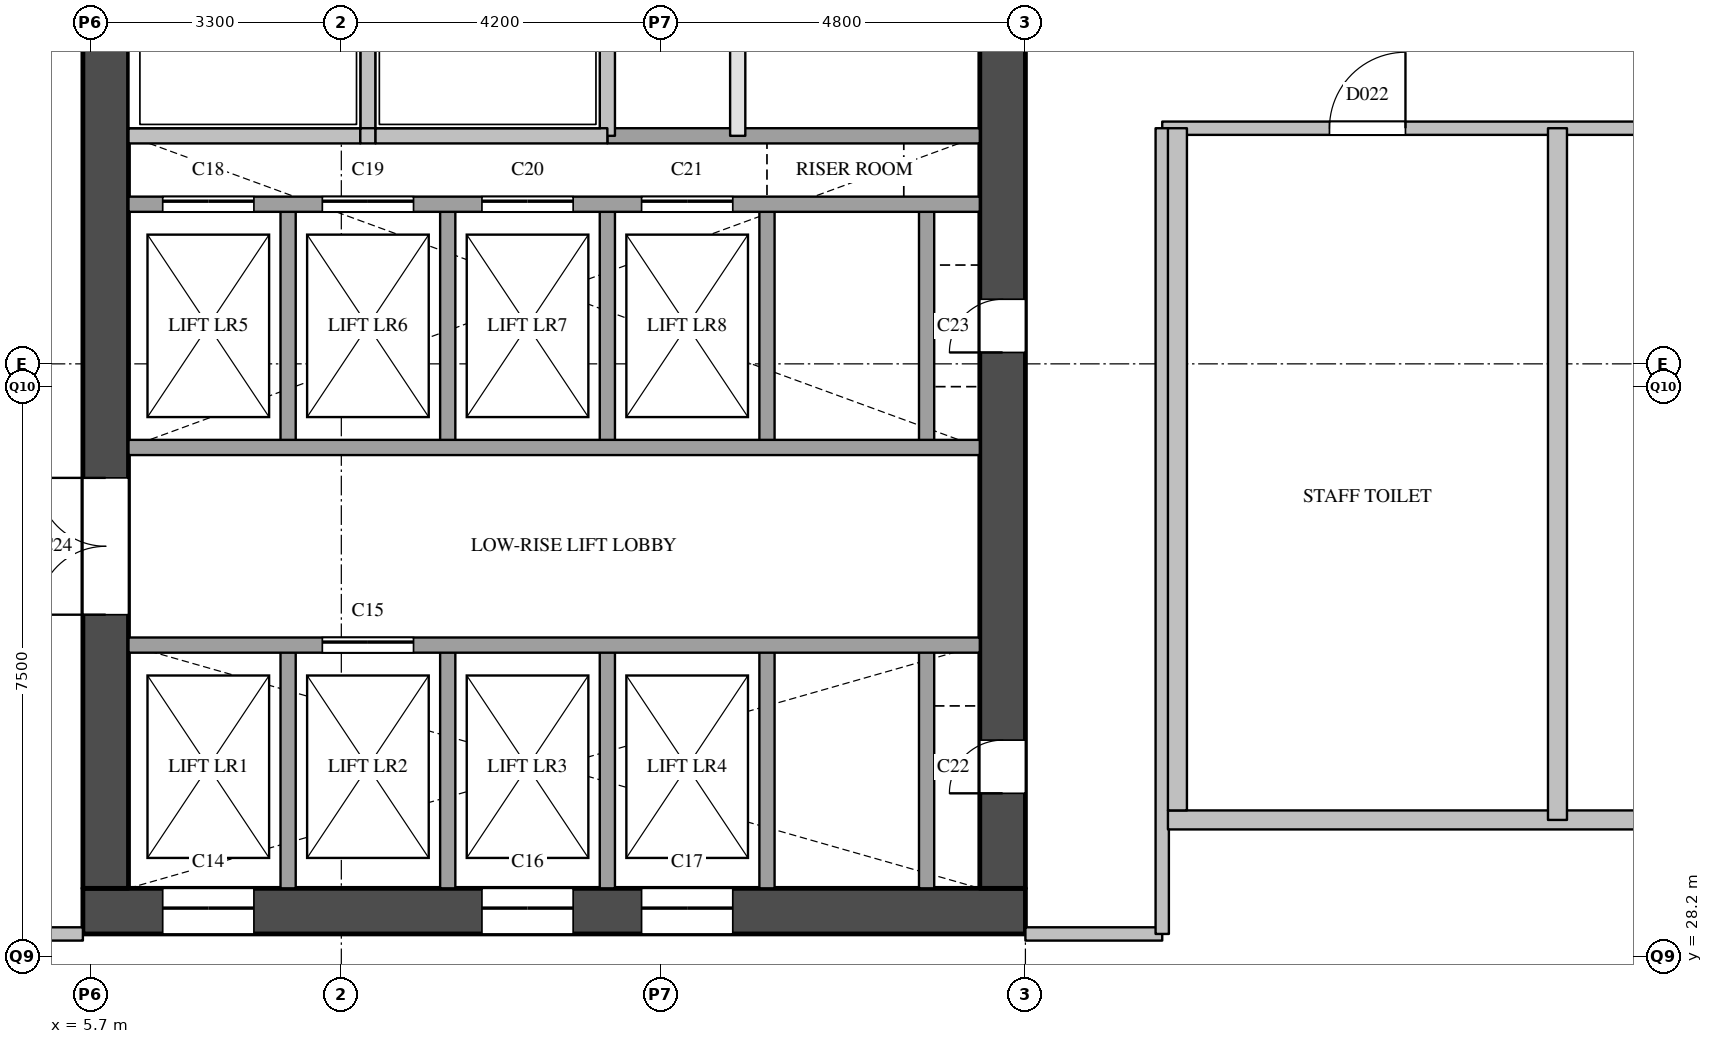
"""IFC4 building model, lengths in metres.
Left out: names, types, materials, properties, quantities, classifications, styles, units other than length and angle.
Written with IfcOpenShell. Run it as: python <this file> out.ifc"""

import sys

from ifc_helpers import new_model, si_unit, direction, frame, frame_2d, origin, place, context, subcontext, project, spatial, rectangle, extrude, element, fill, save


model = new_model("IFC4")
c1 = context("Model", 3, precision=1e-05, world=origin(), true_north=direction((0.0, 1.0)))
c2 = subcontext(c1, "Body", "Model", "MODEL_VIEW")
j1 = project(units=[si_unit("LENGTHUNIT", "METRE"), si_unit("PLANEANGLEUNIT", "RADIAN")], contexts=[c1])
p1 = place(None, origin())
s1 = spatial("IfcSite", under=j1, at=p1, CompositionType="ELEMENT")
p2 = place(p1, origin())
s2 = spatial("IfcBuilding", under=s1, at=p2, CompositionType="ELEMENT")
p3 = place(p2, frame((0.0, 0.0, 119.6)))
s3 = spatial("IfcBuildingStorey", under=s2, at=p3, CompositionType="ELEMENT", Elevation=119.6)
p4 = place(p3, frame((5.6, 28.8, 0.0), z_axis=(0.0, 0.0, 1.0), x_axis=(1.0, 0.0, 0.0)))
e1 = element("IfcWall", 1, at=p4, inside=s3, PredefinedType="SHEAR", context=c2, shape_type="SweptSolid", body=[
    extrude(rectangle(XDim=12.4, YDim=0.6, at=frame_2d((6.2, 0.0))), origin(), (0.0, 0.0, 1.0), 3.3),
])
p5 = place(p4, frame((1.05, 0.0, 0.0)))
e2 = element("IfcOpeningElement", 2, at=p5, cuts=e1, PredefinedType="OPENING", context=c2, shape_type="SweptSolid", body=[
    extrude(rectangle(XDim=1.2, YDim=2.1, at=frame_2d((0.6, 1.05))), frame((0.0, 0.31, 0.0), z_axis=(0.0, -1.0, 0.0), x_axis=(1.0, 0.0, 0.0)), (0.0, 0.0, 1.0), 0.62),
])
p6 = place(p4, frame((5.25, 0.0, 0.0)))
e3 = element("IfcOpeningElement", 3, at=p6, cuts=e1, PredefinedType="OPENING", context=c2, shape_type="SweptSolid", body=[
    extrude(rectangle(XDim=1.2, YDim=2.1, at=frame_2d((0.6, 1.05))), frame((0.0, 0.31, 0.0), z_axis=(0.0, -1.0, 0.0), x_axis=(1.0, 0.0, 0.0)), (0.0, 0.0, 1.0), 0.62),
])
p7 = place(p4, frame((7.35, 0.0, 0.0)))
e4 = element("IfcOpeningElement", 4, at=p7, cuts=e1, PredefinedType="OPENING", context=c2, shape_type="SweptSolid", body=[
    extrude(rectangle(XDim=1.2, YDim=2.1, at=frame_2d((0.6, 1.05))), frame((0.0, 0.31, 0.0), z_axis=(0.0, -1.0, 0.0), x_axis=(1.0, 0.0, 0.0)), (0.0, 0.0, 1.0), 0.62),
])
p8 = place(p3, frame((5.9, 29.1, 0.0), z_axis=(0.0, 0.0, 1.0), x_axis=(0.0, 1.0, 0.0)))
e5 = element("IfcWall", 5, at=p8, inside=s3, PredefinedType="SHEAR", context=c2, shape_type="SweptSolid", body=[
    extrude(rectangle(XDim=20.3, YDim=0.6, at=frame_2d((10.15, 0.0))), origin(), (0.0, 0.0, 1.0), 3.3),
])
p9 = place(p8, frame((3.6, 0.0, 0.0)))
e6 = element("IfcOpeningElement", 6, at=p9, cuts=e5, PredefinedType="OPENING", context=c2, shape_type="SweptSolid", body=[
    extrude(rectangle(XDim=1.8, YDim=2.1, at=frame_2d((0.9, 1.05))), frame((0.0, 0.31, 0.0), z_axis=(0.0, -1.0, 0.0), x_axis=(1.0, 0.0, 0.0)), (0.0, 0.0, 1.0), 0.62),
])
p10 = place(p8, frame((16.4, 0.0, 0.0)))
e7 = element("IfcOpeningElement", 7, at=p10, cuts=e5, PredefinedType="OPENING", context=c2, shape_type="SweptSolid", body=[
    extrude(rectangle(XDim=1.0, YDim=2.1, at=frame_2d((0.5, 1.05))), frame((0.0, 0.31, 0.0), z_axis=(0.0, -1.0, 0.0), x_axis=(1.0, 0.0, 0.0)), (0.0, 0.0, 1.0), 0.62),
])
p11 = place(p3, frame((17.7, 29.1, 0.0), z_axis=(0.0, 0.0, 1.0), x_axis=(0.0, 1.0, 0.0)))
e8 = element("IfcWall", 8, at=p11, inside=s3, PredefinedType="SHEAR", context=c2, shape_type="SweptSolid", body=[
    extrude(rectangle(XDim=20.3, YDim=0.6, at=frame_2d((10.15, 0.0))), origin(), (0.0, 0.0, 1.0), 3.3),
])
p12 = place(p11, frame((1.25, 0.0, 0.0)))
e9 = element("IfcOpeningElement", 9, at=p12, cuts=e8, PredefinedType="OPENING", context=c2, shape_type="SweptSolid", body=[
    extrude(rectangle(XDim=0.7, YDim=2.1, at=frame_2d((0.35, 1.05))), frame((0.0, 0.31, 0.0), z_axis=(0.0, -1.0, 0.0), x_axis=(1.0, 0.0, 0.0)), (0.0, 0.0, 1.0), 0.62),
])
p13 = place(p11, frame((7.05, 0.0, 0.0)))
e10 = element("IfcOpeningElement", 10, at=p13, cuts=e8, PredefinedType="OPENING", context=c2, shape_type="SweptSolid", body=[
    extrude(rectangle(XDim=0.7, YDim=2.1, at=frame_2d((0.35, 1.05))), frame((0.0, 0.31, 0.0), z_axis=(0.0, -1.0, 0.0), x_axis=(1.0, 0.0, 0.0)), (0.0, 0.0, 1.0), 0.62),
])
p14 = place(p3, frame((8.3, 29.1, 0.0), z_axis=(0.0, 0.0, 1.0), x_axis=(0.0, 1.0, 0.0)))
e11 = element("IfcWall", 11, at=p14, inside=s3, PredefinedType="SOLIDWALL", context=c2, shape_type="SweptSolid", body=[
    extrude(rectangle(XDim=3.2, YDim=0.2, at=frame_2d((1.6, 0.0))), origin(), (0.0, 0.0, 1.0), 3.3),
])
p15 = place(p3, frame((8.3, 34.9, 0.0), z_axis=(0.0, 0.0, 1.0), x_axis=(0.0, 1.0, 0.0)))
e12 = element("IfcWall", 12, at=p15, inside=s3, PredefinedType="SOLIDWALL", context=c2, shape_type="SweptSolid", body=[
    extrude(rectangle(XDim=3.2, YDim=0.2, at=frame_2d((1.6, 0.0))), origin(), (0.0, 0.0, 1.0), 3.3),
])
p16 = place(p3, frame((9.35, 39.0, 0.0), z_axis=(0.0, 0.0, 1.0), x_axis=(0.0, 1.0, 0.0)))
e13 = element("IfcWall", 13, at=p16, inside=s3, PredefinedType="SOLIDWALL", context=c2, shape_type="SweptSolid", body=[
    extrude(rectangle(XDim=1.9, YDim=0.2, at=frame_2d((0.95, 0.0))), origin(), (0.0, 0.0, 1.0), 3.3),
])
p17 = place(p3, frame((10.4, 29.1, 0.0), z_axis=(0.0, 0.0, 1.0), x_axis=(0.0, 1.0, 0.0)))
e14 = element("IfcWall", 14, at=p17, inside=s3, PredefinedType="SOLIDWALL", context=c2, shape_type="SweptSolid", body=[
    extrude(rectangle(XDim=3.2, YDim=0.2, at=frame_2d((1.6, 0.0))), origin(), (0.0, 0.0, 1.0), 3.3),
])
p18 = place(p3, frame((10.4, 34.9, 0.0), z_axis=(0.0, 0.0, 1.0), x_axis=(0.0, 1.0, 0.0)))
e15 = element("IfcWall", 15, at=p18, inside=s3, PredefinedType="SOLIDWALL", context=c2, shape_type="SweptSolid", body=[
    extrude(rectangle(XDim=3.2, YDim=0.2, at=frame_2d((1.6, 0.0))), origin(), (0.0, 0.0, 1.0), 3.3),
])
p19 = place(p3, frame((12.5, 29.1, 0.0), z_axis=(0.0, 0.0, 1.0), x_axis=(0.0, 1.0, 0.0)))
e16 = element("IfcWall", 16, at=p19, inside=s3, PredefinedType="SOLIDWALL", context=c2, shape_type="SweptSolid", body=[
    extrude(rectangle(XDim=3.2, YDim=0.2, at=frame_2d((1.6, 0.0))), origin(), (0.0, 0.0, 1.0), 3.3),
])
p20 = place(p3, frame((12.5, 34.9, 0.0), z_axis=(0.0, 0.0, 1.0), x_axis=(0.0, 1.0, 0.0)))
e17 = element("IfcWall", 17, at=p20, inside=s3, PredefinedType="SOLIDWALL", context=c2, shape_type="SweptSolid", body=[
    extrude(rectangle(XDim=3.2, YDim=0.2, at=frame_2d((1.6, 0.0))), origin(), (0.0, 0.0, 1.0), 3.3),
])
p21 = place(p3, frame((12.5, 39.0, 0.0), z_axis=(0.0, 0.0, 1.0), x_axis=(0.0, 1.0, 0.0)))
e18 = element("IfcWall", 18, at=p21, inside=s3, PredefinedType="SOLIDWALL", context=c2, shape_type="SweptSolid", body=[
    extrude(rectangle(XDim=1.9, YDim=0.2, at=frame_2d((0.95, 0.0))), origin(), (0.0, 0.0, 1.0), 3.3),
])
p22 = place(p3, frame((14.215, 39.0, 0.0), z_axis=(0.0, 0.0, 1.0), x_axis=(0.0, 1.0, 0.0)))
e19 = element("IfcWall", 19, at=p22, inside=s3, PredefinedType="PARTITIONING", context=c2, shape_type="SweptSolid", body=[
    extrude(rectangle(XDim=6.2, YDim=0.2, at=frame_2d((3.1, 0.0))), origin(), (0.0, 0.0, 1.0), 3.3),
])
p23 = place(p3, frame((14.6, 29.1, 0.0), z_axis=(0.0, 0.0, 1.0), x_axis=(0.0, 1.0, 0.0)))
e20 = element("IfcWall", 20, at=p23, inside=s3, PredefinedType="SOLIDWALL", context=c2, shape_type="SweptSolid", body=[
    extrude(rectangle(XDim=3.2, YDim=0.2, at=frame_2d((1.6, 0.0))), origin(), (0.0, 0.0, 1.0), 3.3),
])
p24 = place(p3, frame((14.6, 34.9, 0.0), z_axis=(0.0, 0.0, 1.0), x_axis=(0.0, 1.0, 0.0)))
e21 = element("IfcWall", 21, at=p24, inside=s3, PredefinedType="SOLIDWALL", context=c2, shape_type="SweptSolid", body=[
    extrude(rectangle(XDim=3.2, YDim=0.2, at=frame_2d((1.6, 0.0))), origin(), (0.0, 0.0, 1.0), 3.3),
])
p25 = place(p3, frame((16.7, 29.1, 0.0), z_axis=(0.0, 0.0, 1.0), x_axis=(0.0, 1.0, 0.0)))
e22 = element("IfcWall", 22, at=p25, inside=s3, PredefinedType="SOLIDWALL", context=c2, shape_type="SweptSolid", body=[
    extrude(rectangle(XDim=3.2, YDim=0.2, at=frame_2d((1.6, 0.0))), origin(), (0.0, 0.0, 1.0), 3.3),
])
p26 = place(p3, frame((16.7, 34.9, 0.0), z_axis=(0.0, 0.0, 1.0), x_axis=(0.0, 1.0, 0.0)))
e23 = element("IfcWall", 23, at=p26, inside=s3, PredefinedType="SOLIDWALL", context=c2, shape_type="SweptSolid", body=[
    extrude(rectangle(XDim=3.2, YDim=0.2, at=frame_2d((1.6, 0.0))), origin(), (0.0, 0.0, 1.0), 3.3),
])
p27 = place(p3, frame((6.2, 32.3, 0.0), z_axis=(0.0, 0.0, 1.0), x_axis=(1.0, 0.0, 0.0)))
e24 = element("IfcWall", 24, at=p27, inside=s3, PredefinedType="SOLIDWALL", context=c2, shape_type="SweptSolid", body=[
    extrude(rectangle(XDim=11.2, YDim=0.2, at=frame_2d((5.6, 0.0))), origin(), (0.0, 0.0, 1.0), 3.3),
])
p28 = place(p27, frame((2.55, 0.0, 0.0)))
e25 = element("IfcOpeningElement", 25, at=p28, cuts=e24, PredefinedType="OPENING", context=c2, shape_type="SweptSolid", body=[
    extrude(rectangle(XDim=1.2, YDim=2.1, at=frame_2d((0.6, 1.05))), frame((0.0, 0.11, 0.0), z_axis=(0.0, -1.0, 0.0), x_axis=(1.0, 0.0, 0.0)), (0.0, 0.0, 1.0), 0.22),
])
p29 = place(p3, frame((6.2, 34.9, 0.0), z_axis=(0.0, 0.0, 1.0), x_axis=(1.0, 0.0, 0.0)))
e26 = element("IfcWall", 26, at=p29, inside=s3, PredefinedType="SOLIDWALL", context=c2, shape_type="SweptSolid", body=[
    extrude(rectangle(XDim=11.2, YDim=0.2, at=frame_2d((5.6, 0.0))), origin(), (0.0, 0.0, 1.0), 3.3),
])
p30 = place(p3, frame((6.2, 38.1, 0.0), z_axis=(0.0, 0.0, 1.0), x_axis=(1.0, 0.0, 0.0)))
e27 = element("IfcWall", 27, at=p30, inside=s3, PredefinedType="SOLIDWALL", context=c2, shape_type="SweptSolid", body=[
    extrude(rectangle(XDim=11.2, YDim=0.2, at=frame_2d((5.6, 0.0))), origin(), (0.0, 0.0, 1.0), 3.3),
])
p31 = place(p30, frame((0.45, 0.0, 0.0)))
e28 = element("IfcOpeningElement", 28, at=p31, cuts=e27, PredefinedType="OPENING", context=c2, shape_type="SweptSolid", body=[
    extrude(rectangle(XDim=1.2, YDim=2.1, at=frame_2d((0.6, 1.05))), frame((0.0, 0.11, 0.0), z_axis=(0.0, -1.0, 0.0), x_axis=(1.0, 0.0, 0.0)), (0.0, 0.0, 1.0), 0.22),
])
p32 = place(p30, frame((2.55, 0.0, 0.0)))
e29 = element("IfcOpeningElement", 29, at=p32, cuts=e27, PredefinedType="OPENING", context=c2, shape_type="SweptSolid", body=[
    extrude(rectangle(XDim=1.2, YDim=2.1, at=frame_2d((0.6, 1.05))), frame((0.0, 0.11, 0.0), z_axis=(0.0, -1.0, 0.0), x_axis=(1.0, 0.0, 0.0)), (0.0, 0.0, 1.0), 0.22),
])
p33 = place(p30, frame((4.65, 0.0, 0.0)))
e30 = element("IfcOpeningElement", 30, at=p33, cuts=e27, PredefinedType="OPENING", context=c2, shape_type="SweptSolid", body=[
    extrude(rectangle(XDim=1.2, YDim=2.1, at=frame_2d((0.6, 1.05))), frame((0.0, 0.11, 0.0), z_axis=(0.0, -1.0, 0.0), x_axis=(1.0, 0.0, 0.0)), (0.0, 0.0, 1.0), 0.22),
])
p34 = place(p30, frame((6.75, 0.0, 0.0)))
e31 = element("IfcOpeningElement", 31, at=p34, cuts=e27, PredefinedType="OPENING", context=c2, shape_type="SweptSolid", body=[
    extrude(rectangle(XDim=1.2, YDim=2.1, at=frame_2d((0.6, 1.05))), frame((0.0, 0.11, 0.0), z_axis=(0.0, -1.0, 0.0), x_axis=(1.0, 0.0, 0.0)), (0.0, 0.0, 1.0), 0.22),
])
p35 = place(p3, frame((12.5, 39.0, 0.0), z_axis=(0.0, 0.0, 1.0), x_axis=(1.0, 0.0, 0.0)))
e32 = element("IfcWall", 32, at=p35, inside=s3, PredefinedType="SOLIDWALL", context=c2, shape_type="SweptSolid", body=[
    extrude(rectangle(XDim=4.9, YDim=0.2, at=frame_2d((2.45, 0.0))), origin(), (0.0, 0.0, 1.0), 3.3),
])
p36 = place(p3, frame((6.2, 39.0, 0.0), z_axis=(0.0, 0.0, 1.0), x_axis=(1.0, 0.0, 0.0)))
e33 = element("IfcWall", 33, at=p36, inside=s3, PredefinedType="SOLIDWALL", context=c2, shape_type="SweptSolid", body=[
    extrude(rectangle(XDim=3.05, YDim=0.2, at=frame_2d((1.525, 0.0))), origin(), (0.0, 0.0, 1.0), 3.3),
])
p37 = place(p3, frame((9.25, 39.0, 0.0), z_axis=(0.0, 0.0, 1.0), x_axis=(1.0, 0.0, 0.0)))
e34 = element("IfcWall", 34, at=p37, inside=s3, PredefinedType="SOLIDWALL", context=c2, shape_type="SweptSolid", body=[
    extrude(rectangle(XDim=0.2, YDim=0.2, at=frame_2d((0.1, 0.0))), origin(), (0.0, 0.0, 1.0), 3.3),
])
p38 = place(p3, frame((9.45, 39.0, 0.0), z_axis=(0.0, 0.0, 1.0), x_axis=(1.0, 0.0, 0.0)))
e35 = element("IfcWall", 35, at=p38, inside=s3, PredefinedType="SOLIDWALL", context=c2, shape_type="SweptSolid", body=[
    extrude(rectangle(XDim=3.05, YDim=0.2, at=frame_2d((1.525, 0.0))), origin(), (0.0, 0.0, 1.0), 3.3),
])
for number, where, z_axis, x_axis in (
    (36, (3.8, 28.5, 0.0), (0.0, 0.0, 1.0), (1.0, 0.0, 0.0)),
    (37, (18.0, 28.5, 0.0), (0.0, 0.0, 1.0), (1.0, 0.0, 0.0)),
):
    element("IfcWall", number, at=place(p3, frame(where, z_axis=z_axis, x_axis=x_axis)), inside=s3, PredefinedType="PARTITIONING", context=c2, shape_type="SweptSolid", body=[
        extrude(rectangle(XDim=1.8, YDim=0.175, at=frame_2d((0.9, 0.0))), origin(), (0.0, 0.0, 1.0), 3.3),
    ])
p39 = place(p3, frame((19.8, 39.1, 0.0), z_axis=(0.0, 0.0, 1.0), x_axis=(1.0, 0.0, 0.0)))
e38 = element("IfcWall", 38, at=p39, inside=s3, PredefinedType="PARTITIONING", context=c2, shape_type="SweptSolid", body=[
    extrude(rectangle(XDim=14.4, YDim=0.175, at=frame_2d((7.2, 0.0))), origin(), (0.0, 0.0, 1.0), 2.3),
])
p40 = place(p39, frame((2.2, 0.0, 0.0)))
e39 = element("IfcOpeningElement", 39, at=p40, cuts=e38, PredefinedType="OPENING", context=c2, shape_type="SweptSolid", body=[
    extrude(rectangle(XDim=1.0, YDim=2.1, at=frame_2d((0.5, 1.05))), frame((0.0, 0.097, 0.0), z_axis=(0.0, -1.0, 0.0), x_axis=(1.0, 0.0, 0.0)), (0.0, 0.0, 1.0), 0.195),
])
p41 = place(p39, frame((9.35, 0.0, 0.0)))
e40 = element("IfcOpeningElement", 40, at=p41, cuts=e38, PredefinedType="OPENING", context=c2, shape_type="SweptSolid", body=[
    extrude(rectangle(XDim=0.9, YDim=2.1, at=frame_2d((0.45, 1.05))), frame((0.0, 0.097, 0.0), z_axis=(0.0, -1.0, 0.0), x_axis=(1.0, 0.0, 0.0)), (0.0, 0.0, 1.0), 0.195),
])
p42 = place(p3, frame((19.8, 28.5, 0.0), z_axis=(0.0, 0.0, 1.0), x_axis=(0.0, 1.0, 0.0)))
e41 = element("IfcWall", 41, at=p42, inside=s3, PredefinedType="PARTITIONING", context=c2, shape_type="SweptSolid", body=[
    extrude(rectangle(XDim=10.6, YDim=0.175, at=frame_2d((5.3, 0.0))), origin(), (0.0, 0.0, 1.0), 3.3),
])
p43 = place(p3, frame((19.875, 30.0, 0.0), z_axis=(0.0, 0.0, 1.0), x_axis=(1.0, 0.0, 0.0)))
e42 = element("IfcWall", 42, at=p43, inside=s3, PredefinedType="PARTITIONING", context=c2, shape_type="SweptSolid", body=[
    extrude(rectangle(XDim=14.325, YDim=0.25, at=frame_2d((7.163, 0.0))), origin(), (0.0, 0.0, 1.0), 2.3),
])
p44 = place(p3, frame((20.0, 30.125, 0.0), z_axis=(0.0, 0.0, 1.0), x_axis=(0.0, 1.0, 0.0)))
e43 = element("IfcWall", 43, at=p44, inside=s3, PredefinedType="PARTITIONING", context=c2, shape_type="SweptSolid", body=[
    extrude(rectangle(XDim=8.975, YDim=0.25, at=frame_2d((4.488, 0.0))), origin(), (0.0, 0.0, 1.0), 3.3),
])
p45 = place(p3, frame((25.0, 30.0, 0.0), z_axis=(0.0, 0.0, 1.0), x_axis=(0.0, 1.0, 0.0)))
e44 = element("IfcWall", 44, at=p45, inside=s3, PredefinedType="PARTITIONING", context=c2, shape_type="SweptSolid", body=[
    extrude(rectangle(XDim=9.1, YDim=0.25, at=frame_2d((4.55, 0.0))), origin(), (0.0, 0.0, 1.0), 3.3),
])
p46 = place(p5, origin())
e45 = element("IfcDoor", 45, at=p46, inside=s3, OperationType="SLIDING_TO_LEFT", PredefinedType="DOOR", context=c2, shape_type="SweptSolid", body=[
    extrude(rectangle(XDim=1.2, YDim=2.1, at=frame_2d((0.6, 1.05))), frame((0.0, 0.025, 0.0), z_axis=(0.0, -1.0, 0.0), x_axis=(1.0, 0.0, 0.0)), (0.0, 0.0, 1.0), 0.05),
])
fill(e2, e45)
p47 = place(p28, origin())
e46 = element("IfcDoor", 46, at=p47, inside=s3, OperationType="SLIDING_TO_LEFT", PredefinedType="DOOR", context=c2, shape_type="SweptSolid", body=[
    extrude(rectangle(XDim=1.2, YDim=2.1, at=frame_2d((0.6, 1.05))), frame((0.0, 0.025, 0.0), z_axis=(0.0, -1.0, 0.0), x_axis=(1.0, 0.0, 0.0)), (0.0, 0.0, 1.0), 0.05),
])
fill(e25, e46)
p48 = place(p6, origin())
e47 = element("IfcDoor", 47, at=p48, inside=s3, OperationType="SLIDING_TO_LEFT", PredefinedType="DOOR", context=c2, shape_type="SweptSolid", body=[
    extrude(rectangle(XDim=1.2, YDim=2.1, at=frame_2d((0.6, 1.05))), frame((0.0, 0.025, 0.0), z_axis=(0.0, -1.0, 0.0), x_axis=(1.0, 0.0, 0.0)), (0.0, 0.0, 1.0), 0.05),
])
fill(e3, e47)
p49 = place(p7, origin())
e48 = element("IfcDoor", 48, at=p49, inside=s3, OperationType="SLIDING_TO_LEFT", PredefinedType="DOOR", context=c2, shape_type="SweptSolid", body=[
    extrude(rectangle(XDim=1.2, YDim=2.1, at=frame_2d((0.6, 1.05))), frame((0.0, 0.025, 0.0), z_axis=(0.0, -1.0, 0.0), x_axis=(1.0, 0.0, 0.0)), (0.0, 0.0, 1.0), 0.05),
])
fill(e4, e48)
p50 = place(p31, origin())
e49 = element("IfcDoor", 49, at=p50, inside=s3, OperationType="SLIDING_TO_LEFT", PredefinedType="DOOR", context=c2, shape_type="SweptSolid", body=[
    extrude(rectangle(XDim=1.2, YDim=2.1, at=frame_2d((0.6, 1.05))), frame((0.0, 0.025, 0.0), z_axis=(0.0, -1.0, 0.0), x_axis=(1.0, 0.0, 0.0)), (0.0, 0.0, 1.0), 0.05),
])
fill(e28, e49)
p51 = place(p32, origin())
e50 = element("IfcDoor", 50, at=p51, inside=s3, OperationType="SLIDING_TO_LEFT", PredefinedType="DOOR", context=c2, shape_type="SweptSolid", body=[
    extrude(rectangle(XDim=1.2, YDim=2.1, at=frame_2d((0.6, 1.05))), frame((0.0, 0.025, 0.0), z_axis=(0.0, -1.0, 0.0), x_axis=(1.0, 0.0, 0.0)), (0.0, 0.0, 1.0), 0.05),
])
fill(e29, e50)
p52 = place(p33, origin())
e51 = element("IfcDoor", 51, at=p52, inside=s3, OperationType="SLIDING_TO_LEFT", PredefinedType="DOOR", context=c2, shape_type="SweptSolid", body=[
    extrude(rectangle(XDim=1.2, YDim=2.1, at=frame_2d((0.6, 1.05))), frame((0.0, 0.025, 0.0), z_axis=(0.0, -1.0, 0.0), x_axis=(1.0, 0.0, 0.0)), (0.0, 0.0, 1.0), 0.05),
])
fill(e30, e51)
p53 = place(p34, origin())
e52 = element("IfcDoor", 52, at=p53, inside=s3, OperationType="SLIDING_TO_LEFT", PredefinedType="DOOR", context=c2, shape_type="SweptSolid", body=[
    extrude(rectangle(XDim=1.2, YDim=2.1, at=frame_2d((0.6, 1.05))), frame((0.0, 0.025, 0.0), z_axis=(0.0, -1.0, 0.0), x_axis=(1.0, 0.0, 0.0)), (0.0, 0.0, 1.0), 0.05),
])
fill(e31, e52)
p54 = place(p12, origin())
e53 = element("IfcDoor", 53, at=p54, inside=s3, OperationType="SINGLE_SWING_LEFT", PredefinedType="DOOR", context=c2, shape_type="SweptSolid", body=[
    extrude(rectangle(XDim=0.7, YDim=2.1, at=frame_2d((0.35, 1.05))), frame((0.0, 0.025, 0.0), z_axis=(0.0, -1.0, 0.0), x_axis=(1.0, 0.0, 0.0)), (0.0, 0.0, 1.0), 0.05),
])
fill(e9, e53)
p55 = place(p13, origin())
e54 = element("IfcDoor", 54, at=p55, inside=s3, OperationType="SINGLE_SWING_LEFT", PredefinedType="DOOR", context=c2, shape_type="SweptSolid", body=[
    extrude(rectangle(XDim=0.7, YDim=2.1, at=frame_2d((0.35, 1.05))), frame((0.0, 0.025, 0.0), z_axis=(0.0, -1.0, 0.0), x_axis=(1.0, 0.0, 0.0)), (0.0, 0.0, 1.0), 0.05),
])
fill(e10, e54)
p56 = place(p9, origin())
e55 = element("IfcDoor", 55, at=p56, inside=s3, OperationType="DOUBLE_DOOR_SINGLE_SWING", PredefinedType="DOOR", context=c2, shape_type="SweptSolid", body=[
    extrude(rectangle(XDim=1.8, YDim=2.1, at=frame_2d((0.9, 1.05))), frame((0.0, 0.025, 0.0), z_axis=(0.0, -1.0, 0.0), x_axis=(1.0, 0.0, 0.0)), (0.0, 0.0, 1.0), 0.05),
])
fill(e6, e55)
p57 = place(p40, origin())
e56 = element("IfcDoor", 56, at=p57, inside=s3, OperationType="SINGLE_SWING_RIGHT", PredefinedType="DOOR", context=c2, shape_type="SweptSolid", body=[
    extrude(rectangle(XDim=1.0, YDim=2.1, at=frame_2d((0.5, 1.05))), frame((0.0, 0.025, 0.0), z_axis=(0.0, -1.0, 0.0), x_axis=(1.0, 0.0, 0.0)), (0.0, 0.0, 1.0), 0.05),
])
fill(e39, e56)
save(model, sys.argv[1])
